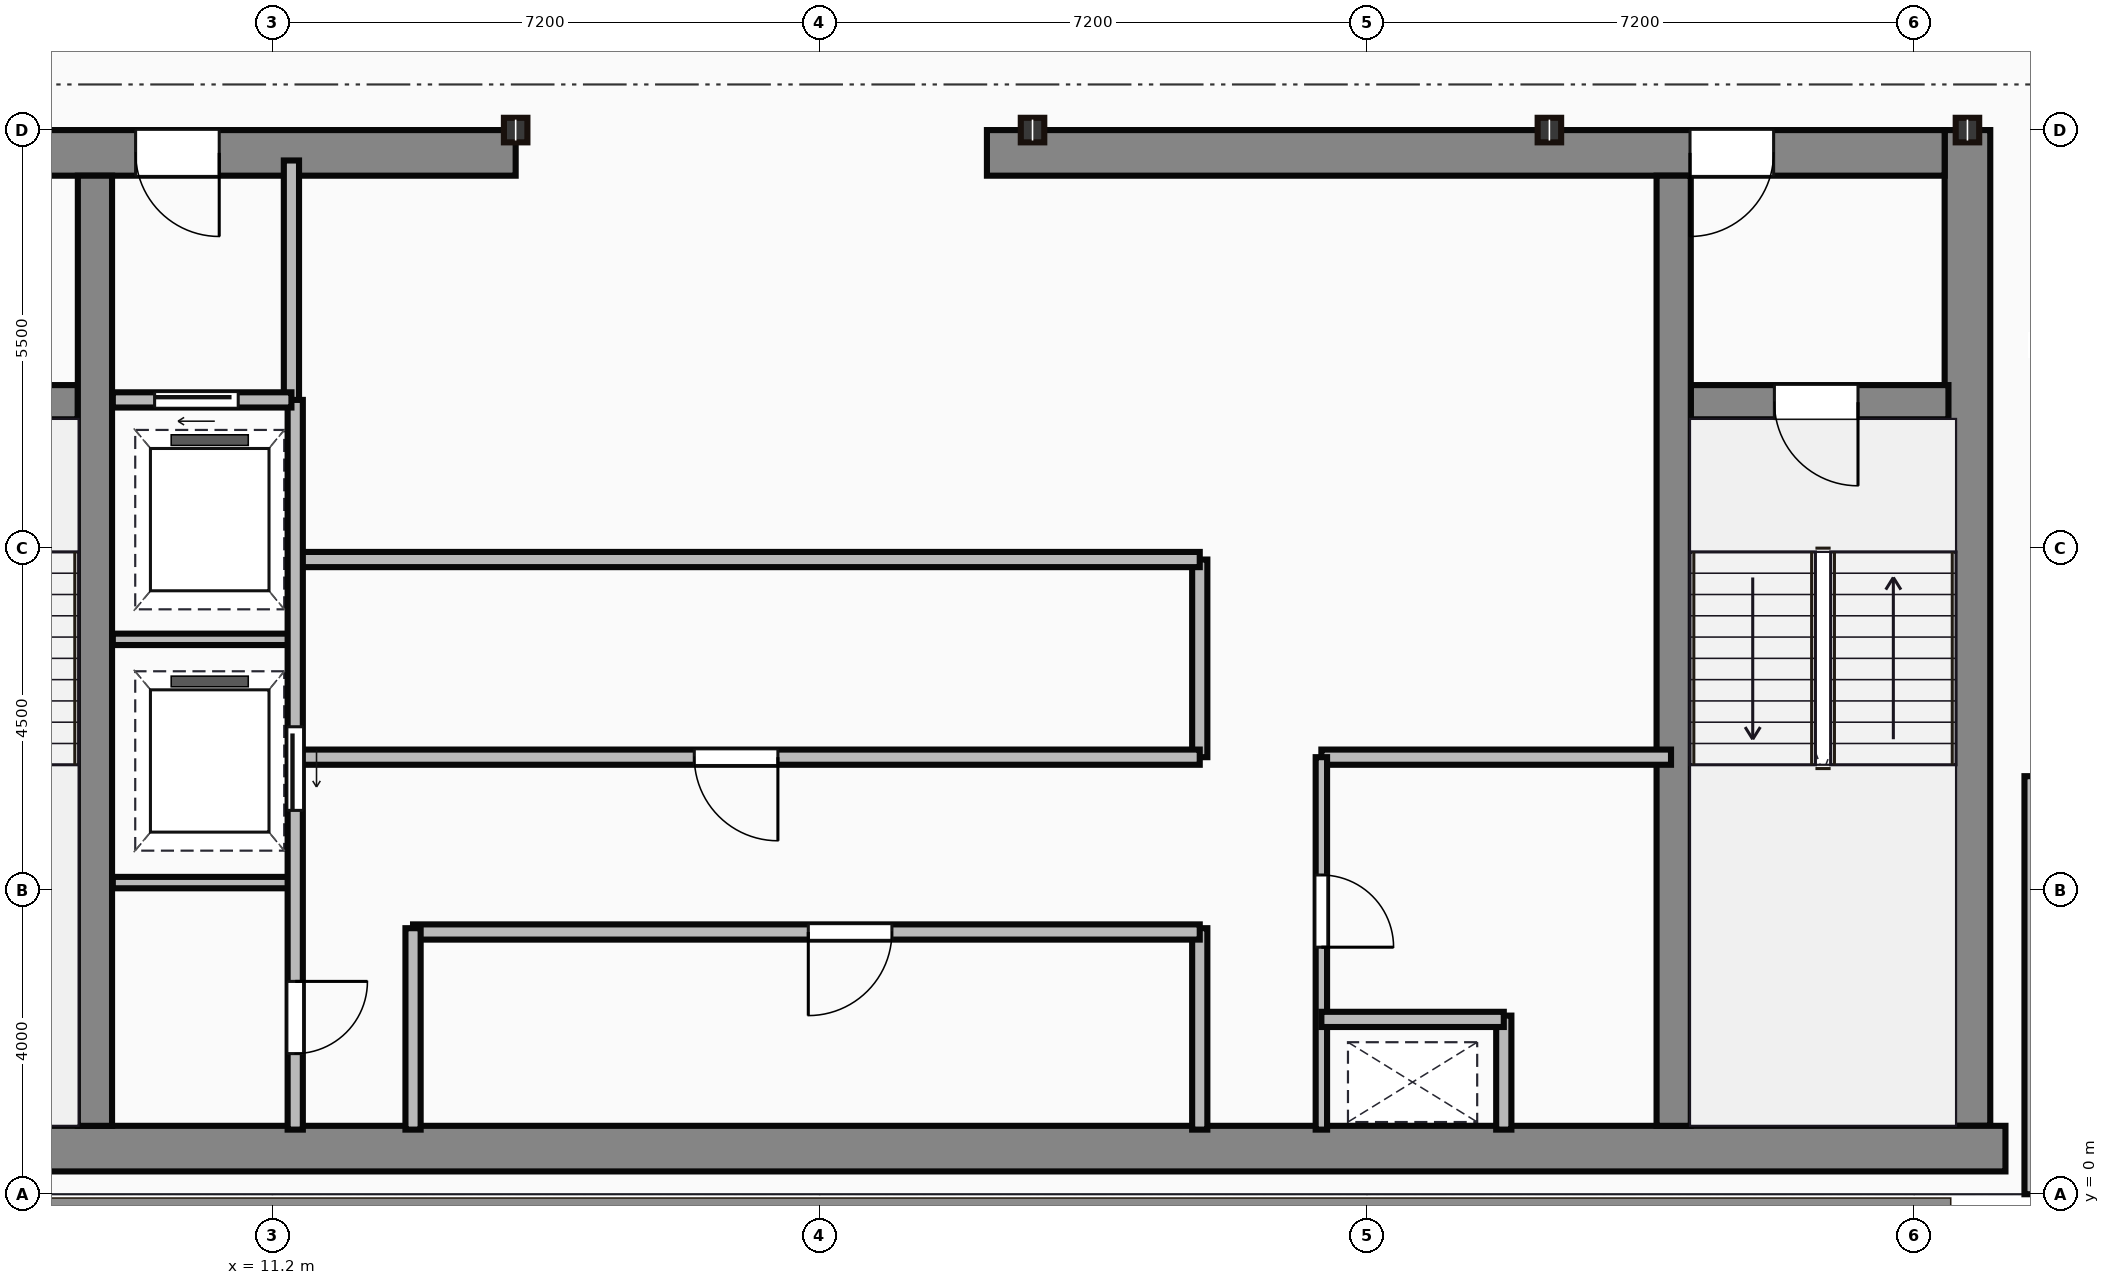
"""IFC4 building model, lengths in metres.
Left out: names, types, materials, properties, quantities, classifications, styles, units other than length and angle.
Written with IfcOpenShell. Run it as: python <this file> out.ifc"""

import sys

from ifc_helpers import new_model, si_unit, direction, frame, frame_2d, origin, origin_2d, place, context, subcontext, project, spatial, rectangle, i_section, extrude, source, transform, mapped, element, fill, save


model = new_model("IFC4")
c1 = context("Model", 3, precision=1e-05, world=origin(), true_north=direction((0.0, 1.0)))
c2 = subcontext(c1, "Body", "Model", "MODEL_VIEW")
j1 = project(units=[si_unit("LENGTHUNIT", "METRE"), si_unit("PLANEANGLEUNIT", "RADIAN")], contexts=[c1])
p1 = place(None, origin())
s1 = spatial("IfcSite", under=j1, at=p1, CompositionType="ELEMENT")
p2 = place(p1, origin())
s2 = spatial("IfcBuilding", under=s1, at=p2, CompositionType="ELEMENT")
p3 = place(p2, frame((0.0, 0.0, 307.45)))
s3 = spatial("IfcBuildingStorey", under=s2, at=p3, CompositionType="ELEMENT", Elevation=307.45)
m1 = source(origin(), c2, "Body", "SweptSolid", [
    extrude(rectangle(XDim=29.5, YDim=0.6, at=frame_2d((14.75, 0.0))), origin(), (0.0, 0.0, 1.0), 3.8),
])
p4 = place(p3, frame((4.5, 0.6, 0.0), z_axis=(0.0, 0.0, 1.0), x_axis=(1.0, 0.0, 0.0)))
e1 = element("IfcWall", 1, at=p4, inside=s3, PredefinedType="SHEAR", context=c2, shape_type="MappedRepresentation", body=[
    mapped(m1, transform((0.0, 0.0, 0.0))),
])
m2 = source(origin(), c2, "Body", "SweptSolid", [
    extrude(rectangle(XDim=13.1, YDim=0.6, at=frame_2d((6.55, 0.0))), origin(), (0.0, 0.0, 1.0), 3.8),
])
p5 = place(p3, frame((33.5, 0.9, 0.0), z_axis=(0.0, 0.0, 1.0), x_axis=(0.0, 1.0, 0.0)))
e2 = element("IfcWall", 2, at=p5, inside=s3, PredefinedType="SHEAR", context=c2, shape_type="MappedRepresentation", body=[
    mapped(m2, transform((0.0, 0.0, 0.0))),
])
m3 = source(origin(), c2, "Body", "SweptSolid", [
    extrude(rectangle(XDim=9.1, YDim=0.6, at=frame_2d((4.55, 0.0))), origin(), (0.0, 0.0, 1.0), 3.8),
])
p6 = place(p3, frame((5.3, 13.7, 0.0), z_axis=(0.0, 0.0, 1.0), x_axis=(1.0, 0.0, 0.0)))
e3 = element("IfcWall", 3, at=p6, inside=s3, PredefinedType="SHEAR", context=c2, shape_type="MappedRepresentation", body=[
    mapped(m3, transform((0.0, 0.0, 0.0))),
])
p7 = place(p6, frame((4.1, 0.0, 0.0)))
e4 = element("IfcOpeningElement", 4, at=p7, cuts=e3, PredefinedType="OPENING", context=c2, shape_type="SweptSolid", body=[
    extrude(rectangle(XDim=1.1, YDim=2.15, at=frame_2d((0.55, 1.075))), frame((0.0, 0.31, 0.0), z_axis=(0.0, -1.0, 0.0), x_axis=(1.0, 0.0, 0.0)), (0.0, 0.0, 1.0), 0.62),
])
m4 = source(origin(), c2, "Body", "SweptSolid", [
    extrude(rectangle(XDim=12.6, YDim=0.6, at=frame_2d((6.3, 0.0))), origin(), (0.0, 0.0, 1.0), 3.8),
])
p8 = place(p3, frame((20.6, 13.7, 0.0), z_axis=(0.0, 0.0, 1.0), x_axis=(1.0, 0.0, 0.0)))
e5 = element("IfcWall", 5, at=p8, inside=s3, PredefinedType="SHEAR", context=c2, shape_type="MappedRepresentation", body=[
    mapped(m4, transform((0.0, 0.0, 0.0))),
])
p9 = place(p8, frame((9.25, 0.0, 0.0)))
e6 = element("IfcOpeningElement", 6, at=p9, cuts=e5, PredefinedType="OPENING", context=c2, shape_type="SweptSolid", body=[
    extrude(rectangle(XDim=1.1, YDim=2.15, at=frame_2d((0.55, 1.075))), frame((0.0, 0.31, 0.0), z_axis=(0.0, -1.0, 0.0), x_axis=(1.0, 0.0, 0.0)), (0.0, 0.0, 1.0), 0.62),
])
m5 = source(origin(), c2, "Body", "SweptSolid", [
    extrude(rectangle(XDim=12.5, YDim=0.45, at=frame_2d((6.25, 0.0))), origin(), (0.0, 0.0, 1.0), 3.8),
])
for number, where, z_axis, x_axis in (
    (7, (8.865, 0.9, 0.0), (0.0, 0.0, 1.0), (0.0, 1.0, 0.0)),
    (8, (29.635, 0.9, 0.0), (0.0, 0.0, 1.0), (0.0, 1.0, 0.0)),
):
    element("IfcWall", number, at=place(p3, frame(where, z_axis=z_axis, x_axis=x_axis)), inside=s3, PredefinedType="SHEAR", context=c2, shape_type="MappedRepresentation", body=[
        mapped(m5, transform((0.0, 0.0, 0.0))),
    ])
m6 = source(origin(), c2, "Body", "SweptSolid", [
    extrude(rectangle(XDim=3.39, YDim=0.45, at=frame_2d((1.695, 0.0))), origin(), (0.0, 0.0, 1.0), 3.8),
])
p10 = place(p3, frame((5.25, 10.42, 0.0), z_axis=(0.0, 0.0, 1.0), x_axis=(1.0, 0.0, 0.0)))
e9 = element("IfcWall", 9, at=p10, inside=s3, PredefinedType="SHEAR", context=c2, shape_type="MappedRepresentation", body=[
    mapped(m6, transform((0.0, 0.0, 0.0))),
])
p11 = place(p10, frame((1.05, 0.0, 0.0)))
e10 = element("IfcOpeningElement", 10, at=p11, cuts=e9, PredefinedType="OPENING", context=c2, shape_type="SweptSolid", body=[
    extrude(rectangle(XDim=1.1, YDim=2.15, at=frame_2d((0.55, 1.075))), frame((0.0, 0.235, 0.0), z_axis=(0.0, -1.0, 0.0), x_axis=(1.0, 0.0, 0.0)), (0.0, 0.0, 1.0), 0.47),
])
p12 = place(p3, frame((29.86, 10.42, 0.0), z_axis=(0.0, 0.0, 1.0), x_axis=(1.0, 0.0, 0.0)))
e11 = element("IfcWall", 11, at=p12, inside=s3, PredefinedType="SHEAR", context=c2, shape_type="MappedRepresentation", body=[
    mapped(m6, transform((0.0, 0.0, 0.0))),
])
p13 = place(p12, frame((1.1, 0.0, 0.0)))
e12 = element("IfcOpeningElement", 12, at=p13, cuts=e11, PredefinedType="OPENING", context=c2, shape_type="SweptSolid", body=[
    extrude(rectangle(XDim=1.1, YDim=2.15, at=frame_2d((0.55, 1.075))), frame((0.0, 0.235, 0.0), z_axis=(0.0, -1.0, 0.0), x_axis=(1.0, 0.0, 0.0)), (0.0, 0.0, 1.0), 0.47),
])
m7 = source(origin(), c2, "Body", "SweptSolid", [
    extrude(i_section(OverallWidth=0.309, OverallDepth=0.323, WebThickness=0.014, FlangeThickness=0.023, at=origin_2d()), origin(), (0.0, 0.0, 1.0), 3.8),
])
for number, where, z_axis, x_axis in (
    (13, (14.4, 14.0, 0.0), (0.0, 0.0, 1.0), (1.0, 0.0, 0.0)),
    (14, (21.2, 14.0, 0.0), (0.0, 0.0, 1.0), (1.0, 0.0, 0.0)),
    (15, (28.0, 14.0, 0.0), (0.0, 0.0, 1.0), (1.0, 0.0, 0.0)),
    (16, (33.5, 14.0, 0.0), (0.0, 0.0, 1.0), (1.0, 0.0, 0.0)),
):
    element("IfcColumn", number, at=place(p3, frame(where, z_axis=z_axis, x_axis=x_axis)), inside=s3, PredefinedType="COLUMN", context=c2, shape_type="MappedRepresentation", body=[
        mapped(m7, transform((0.0, 0.0, 0.0))),
    ])
m8 = source(origin(), c2, "Body", "SweptSolid", [
    extrude(rectangle(XDim=5.5, YDim=0.25, at=frame_2d((2.75, 0.0))), origin(), (0.0, 0.0, 1.0), 3.5),
])
p14 = place(p3, frame((34.375, 0.0, 0.0), z_axis=(0.0, 0.0, 1.0), x_axis=(0.0, 1.0, 0.0)))
e17 = element("IfcWall", 17, at=p14, inside=s3, PredefinedType="STANDARD", context=c2, shape_type="MappedRepresentation", body=[
    mapped(m8, transform((0.0, 0.0, 0.0))),
])
m9 = source(origin(), c2, "Body", "SweptSolid", [
    extrude(rectangle(XDim=3.18, YDim=0.2, at=frame_2d((1.59, 0.0))), origin(), (0.0, 0.0, 1.0), 3.5),
])
p15 = place(p3, frame((11.45, 10.42, 0.0), z_axis=(0.0, 0.0, 1.0), x_axis=(0.0, 1.0, 0.0)))
e18 = element("IfcWall", 18, at=p15, inside=s3, PredefinedType="PARTITIONING", context=c2, shape_type="MappedRepresentation", body=[
    mapped(m9, transform((0.0, 0.0, 0.0))),
])
m10 = source(origin(), c2, "Body", "SweptSolid", [
    extrude(rectangle(XDim=2.35, YDim=0.2, at=frame_2d((1.175, 0.0))), origin(), (0.0, 0.0, 1.0), 3.5),
])
p16 = place(p3, frame((9.1, 10.45, 0.0), z_axis=(0.0, 0.0, 1.0), x_axis=(1.0, 0.0, 0.0)))
e19 = element("IfcWall", 19, at=p16, inside=s3, PredefinedType="PARTITIONING", context=c2, shape_type="MappedRepresentation", body=[
    mapped(m10, transform((0.0, 0.0, 0.0))),
])
p17 = place(p16, frame((0.55, 0.0, 0.0)))
e20 = element("IfcOpeningElement", 20, at=p17, cuts=e19, PredefinedType="OPENING", context=c2, shape_type="SweptSolid", body=[
    extrude(rectangle(XDim=1.1, YDim=2.15, at=frame_2d((0.55, 1.075))), frame((0.0, 0.11, 0.0), z_axis=(0.0, -1.0, 0.0), x_axis=(1.0, 0.0, 0.0)), (0.0, 0.0, 1.0), 0.22),
])
m11 = source(origin(), c2, "Body", "SweptSolid", [
    extrude(rectangle(XDim=9.6, YDim=0.2, at=frame_2d((4.8, 0.0))), origin(), (0.0, 0.0, 1.0), 3.5),
])
p18 = place(p3, frame((11.5, 0.85, 0.0), z_axis=(0.0, 0.0, 1.0), x_axis=(0.0, 1.0, 0.0)))
e21 = element("IfcWall", 21, at=p18, inside=s3, PredefinedType="PARTITIONING", context=c2, shape_type="MappedRepresentation", body=[
    mapped(m11, transform((0.0, 0.0, 0.0))),
])
p19 = place(p18, frame((4.2, 0.0, 0.0)))
e22 = element("IfcOpeningElement", 22, at=p19, cuts=e21, PredefinedType="OPENING", context=c2, shape_type="SweptSolid", body=[
    extrude(rectangle(XDim=1.1, YDim=2.15, at=frame_2d((0.55, 1.075))), frame((0.0, 0.11, 0.0), z_axis=(0.0, -1.0, 0.0), x_axis=(1.0, 0.0, 0.0)), (0.0, 0.0, 1.0), 0.22),
])
p20 = place(p18, frame((1.0, 0.0, 0.0)))
e23 = element("IfcOpeningElement", 23, at=p20, cuts=e21, PredefinedType="OPENING", context=c2, shape_type="SweptSolid", body=[
    extrude(rectangle(XDim=0.95, YDim=2.15, at=frame_2d((0.475, 1.075))), frame((0.0, 0.11, 0.0), z_axis=(0.0, -1.0, 0.0), x_axis=(1.0, 0.0, 0.0)), (0.0, 0.0, 1.0), 0.22),
])
m12 = source(origin(), c2, "Body", "SweptSolid", [
    extrude(rectangle(XDim=2.4, YDim=0.15, at=frame_2d((1.2, 0.0))), origin(), (0.0, 0.0, 1.0), 3.5),
])
for number, where, z_axis, x_axis in (
    (24, (9.1, 4.1, 0.0), (0.0, 0.0, 1.0), (1.0, 0.0, 0.0)),
    (25, (9.1, 7.3, 0.0), (0.0, 0.0, 1.0), (1.0, 0.0, 0.0)),
):
    element("IfcWall", number, at=place(p3, frame(where, z_axis=z_axis, x_axis=x_axis)), inside=s3, PredefinedType="PARTITIONING", context=c2, shape_type="MappedRepresentation", body=[
        mapped(m12, transform((0.0, 0.0, 0.0))),
    ])
m13 = source(origin(), c2, "Body", "SweptSolid", [
    extrude(rectangle(XDim=2.65, YDim=0.2, at=frame_2d((1.325, 0.0))), origin(), (0.0, 0.0, 1.0), 3.5),
])
p21 = place(p3, frame((13.05, 0.85, 0.0), z_axis=(0.0, 0.0, 1.0), x_axis=(0.0, 1.0, 0.0)))
e26 = element("IfcWall", 26, at=p21, inside=s3, PredefinedType="PARTITIONING", context=c2, shape_type="MappedRepresentation", body=[
    mapped(m13, transform((0.0, 0.0, 0.0))),
])
m14 = source(origin(), c2, "Body", "SweptSolid", [
    extrude(rectangle(XDim=10.35, YDim=0.2, at=frame_2d((5.175, 0.0))), origin(), (0.0, 0.0, 1.0), 3.5),
])
p22 = place(p3, frame((13.05, 3.45, 0.0), z_axis=(0.0, 0.0, 1.0), x_axis=(1.0, 0.0, 0.0)))
e27 = element("IfcWall", 27, at=p22, inside=s3, PredefinedType="PARTITIONING", context=c2, shape_type="MappedRepresentation", body=[
    mapped(m14, transform((0.0, 0.0, 0.0))),
])
p23 = place(p22, frame((5.2, 0.0, 0.0)))
e28 = element("IfcOpeningElement", 28, at=p23, cuts=e27, PredefinedType="OPENING", context=c2, shape_type="SweptSolid", body=[
    extrude(rectangle(XDim=1.1, YDim=2.15, at=frame_2d((0.55, 1.075))), frame((0.0, 0.11, 0.0), z_axis=(0.0, -1.0, 0.0), x_axis=(1.0, 0.0, 0.0)), (0.0, 0.0, 1.0), 0.22),
])
p24 = place(p3, frame((23.4, 0.85, 0.0), z_axis=(0.0, 0.0, 1.0), x_axis=(0.0, 1.0, 0.0)))
e29 = element("IfcWall", 29, at=p24, inside=s3, PredefinedType="PARTITIONING", context=c2, shape_type="MappedRepresentation", body=[
    mapped(m13, transform((0.0, 0.0, 0.0))),
])
m15 = source(origin(), c2, "Body", "SweptSolid", [
    extrude(rectangle(XDim=11.85, YDim=0.2, at=frame_2d((5.925, 0.0))), origin(), (0.0, 0.0, 1.0), 3.5),
])
p25 = place(p3, frame((11.55, 5.75, 0.0), z_axis=(0.0, 0.0, 1.0), x_axis=(1.0, 0.0, 0.0)))
e30 = element("IfcWall", 30, at=p25, inside=s3, PredefinedType="PARTITIONING", context=c2, shape_type="MappedRepresentation", body=[
    mapped(m15, transform((0.0, 0.0, 0.0))),
])
p26 = place(p25, frame((5.2, 0.0, 0.0)))
e31 = element("IfcOpeningElement", 31, at=p26, cuts=e30, PredefinedType="OPENING", context=c2, shape_type="SweptSolid", body=[
    extrude(rectangle(XDim=1.1, YDim=2.15, at=frame_2d((0.55, 1.075))), frame((0.0, 0.11, 0.0), z_axis=(0.0, -1.0, 0.0), x_axis=(1.0, 0.0, 0.0)), (0.0, 0.0, 1.0), 0.22),
])
p27 = place(p3, frame((11.55, 8.35, 0.0), z_axis=(0.0, 0.0, 1.0), x_axis=(1.0, 0.0, 0.0)))
e32 = element("IfcWall", 32, at=p27, inside=s3, PredefinedType="PARTITIONING", context=c2, shape_type="MappedRepresentation", body=[
    mapped(m15, transform((0.0, 0.0, 0.0))),
])
m16 = source(origin(), c2, "Body", "SweptSolid", [
    extrude(rectangle(XDim=2.6, YDim=0.2, at=frame_2d((1.3, 0.0))), origin(), (0.0, 0.0, 1.0), 3.5),
])
p28 = place(p3, frame((23.4, 5.75, 0.0), z_axis=(0.0, 0.0, 1.0), x_axis=(0.0, 1.0, 0.0)))
e33 = element("IfcWall", 33, at=p28, inside=s3, PredefinedType="PARTITIONING", context=c2, shape_type="MappedRepresentation", body=[
    mapped(m16, transform((0.0, 0.0, 0.0))),
])
m17 = source(origin(), c2, "Body", "SweptSolid", [
    extrude(rectangle(XDim=4.9, YDim=0.15, at=frame_2d((2.45, 0.0))), origin(), (0.0, 0.0, 1.0), 3.5),
])
p29 = place(p3, frame((25.0, 0.85, 0.0), z_axis=(0.0, 0.0, 1.0), x_axis=(0.0, 1.0, 0.0)))
e34 = element("IfcWall", 34, at=p29, inside=s3, PredefinedType="PARTITIONING", context=c2, shape_type="MappedRepresentation", body=[
    mapped(m17, transform((0.0, 0.0, 0.0))),
])
p30 = place(p29, frame((2.4, 0.0, 0.0)))
e35 = element("IfcOpeningElement", 35, at=p30, cuts=e34, PredefinedType="OPENING", context=c2, shape_type="SweptSolid", body=[
    extrude(rectangle(XDim=0.95, YDim=2.15, at=frame_2d((0.475, 1.075))), frame((0.0, 0.085, 0.0), z_axis=(0.0, -1.0, 0.0), x_axis=(1.0, 0.0, 0.0)), (0.0, 0.0, 1.0), 0.17),
])
m18 = source(origin(), c2, "Body", "SweptSolid", [
    extrude(rectangle(XDim=4.6, YDim=0.2, at=frame_2d((2.3, 0.0))), origin(), (0.0, 0.0, 1.0), 3.5),
])
p31 = place(p3, frame((25.0, 5.75, 0.0), z_axis=(0.0, 0.0, 1.0), x_axis=(1.0, 0.0, 0.0)))
e36 = element("IfcWall", 36, at=p31, inside=s3, PredefinedType="PARTITIONING", context=c2, shape_type="MappedRepresentation", body=[
    mapped(m18, transform((0.0, 0.0, 0.0))),
])
m19 = source(origin(), c2, "Body", "SweptSolid", [
    extrude(rectangle(XDim=2.4, YDim=0.2, at=frame_2d((1.2, 0.0))), origin(), (0.0, 0.0, 1.0), 3.5),
])
p32 = place(p3, frame((25.0, 2.3, 0.0), z_axis=(0.0, 0.0, 1.0), x_axis=(1.0, 0.0, 0.0)))
e37 = element("IfcWall", 37, at=p32, inside=s3, PredefinedType="PARTITIONING", context=c2, shape_type="MappedRepresentation", body=[
    mapped(m19, transform((0.0, 0.0, 0.0))),
])
m20 = source(origin(), c2, "Body", "SweptSolid", [
    extrude(rectangle(XDim=1.5, YDim=0.2, at=frame_2d((0.75, 0.0))), origin(), (0.0, 0.0, 1.0), 3.5),
])
p33 = place(p3, frame((27.4, 0.85, 0.0), z_axis=(0.0, 0.0, 1.0), x_axis=(0.0, 1.0, 0.0)))
e38 = element("IfcWall", 38, at=p33, inside=s3, PredefinedType="PARTITIONING", context=c2, shape_type="MappedRepresentation", body=[
    mapped(m20, transform((0.0, 0.0, 0.0))),
])
m21 = source(origin(), c2, "Body", "SweptSolid", [
    extrude(rectangle(XDim=1.1, YDim=2.15, at=frame_2d((0.55, 1.075))), frame((0.0, 0.025, 0.0), z_axis=(0.0, -1.0, 0.0), x_axis=(1.0, 0.0, 0.0)), (0.0, 0.0, 1.0), 0.05),
])
p34 = place(p13, frame((1.1, 0.0, 0.0), z_axis=(0.0, 0.0, 1.0), x_axis=(-1.0, 0.0, 0.0)))
e39 = element("IfcDoor", 39, at=p34, inside=s3, OperationType="SINGLE_SWING_RIGHT", PredefinedType="DOOR", context=c2, shape_type="MappedRepresentation", body=[
    mapped(m21, transform((0.0, 0.0, 0.0))),
])
fill(e12, e39)
p35 = place(p7, origin())
e40 = element("IfcDoor", 40, at=p35, inside=s3, OperationType="SINGLE_SWING_RIGHT", PredefinedType="DOOR", context=c2, shape_type="MappedRepresentation", body=[
    mapped(m21, transform((0.0, 0.0, 0.0))),
])
fill(e4, e40)
p36 = place(p9, origin())
e41 = element("IfcDoor", 41, at=p36, inside=s3, OperationType="SINGLE_SWING_LEFT", PredefinedType="DOOR", context=c2, shape_type="MappedRepresentation", body=[
    mapped(m21, transform((0.0, 0.0, 0.0))),
])
fill(e6, e41)
p37 = place(p17, origin())
e42 = element("IfcDoor", 42, at=p37, inside=s3, OperationType="SLIDING_TO_LEFT", PredefinedType="DOOR", context=c2, shape_type="MappedRepresentation", body=[
    mapped(m21, transform((0.0, 0.0, 0.0))),
])
fill(e20, e42)
p38 = place(p19, frame((1.1, 0.0, 0.0), z_axis=(0.0, 0.0, 1.0), x_axis=(-1.0, 0.0, 0.0)))
e43 = element("IfcDoor", 43, at=p38, inside=s3, OperationType="SLIDING_TO_LEFT", PredefinedType="DOOR", context=c2, shape_type="MappedRepresentation", body=[
    mapped(m21, transform((0.0, 0.0, 0.0))),
])
fill(e22, e43)
m22 = source(origin(), c2, "Body", "SweptSolid", [
    extrude(rectangle(XDim=0.95, YDim=2.15, at=frame_2d((0.475, 1.075))), frame((0.0, 0.025, 0.0), z_axis=(0.0, -1.0, 0.0), x_axis=(1.0, 0.0, 0.0)), (0.0, 0.0, 1.0), 0.05),
])
p39 = place(p20, frame((0.95, 0.0, 0.0), z_axis=(0.0, 0.0, 1.0), x_axis=(-1.0, 0.0, 0.0)))
e44 = element("IfcDoor", 44, at=p39, inside=s3, OperationType="SINGLE_SWING_RIGHT", PredefinedType="DOOR", context=c2, shape_type="MappedRepresentation", body=[
    mapped(m22, transform((0.0, 0.0, 0.0))),
])
fill(e23, e44)
p40 = place(p23, origin())
e45 = element("IfcDoor", 45, at=p40, inside=s3, OperationType="SINGLE_SWING_LEFT", PredefinedType="DOOR", context=c2, shape_type="MappedRepresentation", body=[
    mapped(m21, transform((0.0, 0.0, 0.0))),
])
fill(e28, e45)
p41 = place(p26, frame((1.1, 0.0, 0.0), z_axis=(0.0, 0.0, 1.0), x_axis=(-1.0, 0.0, 0.0)))
e46 = element("IfcDoor", 46, at=p41, inside=s3, OperationType="SINGLE_SWING_RIGHT", PredefinedType="DOOR", context=c2, shape_type="MappedRepresentation", body=[
    mapped(m21, transform((0.0, 0.0, 0.0))),
])
fill(e31, e46)
p42 = place(p30, origin())
e47 = element("IfcDoor", 47, at=p42, inside=s3, OperationType="SINGLE_SWING_LEFT", PredefinedType="DOOR", context=c2, shape_type="MappedRepresentation", body=[
    mapped(m22, transform((0.0, 0.0, 0.0))),
])
fill(e35, e47)
save(model, sys.argv[1])
